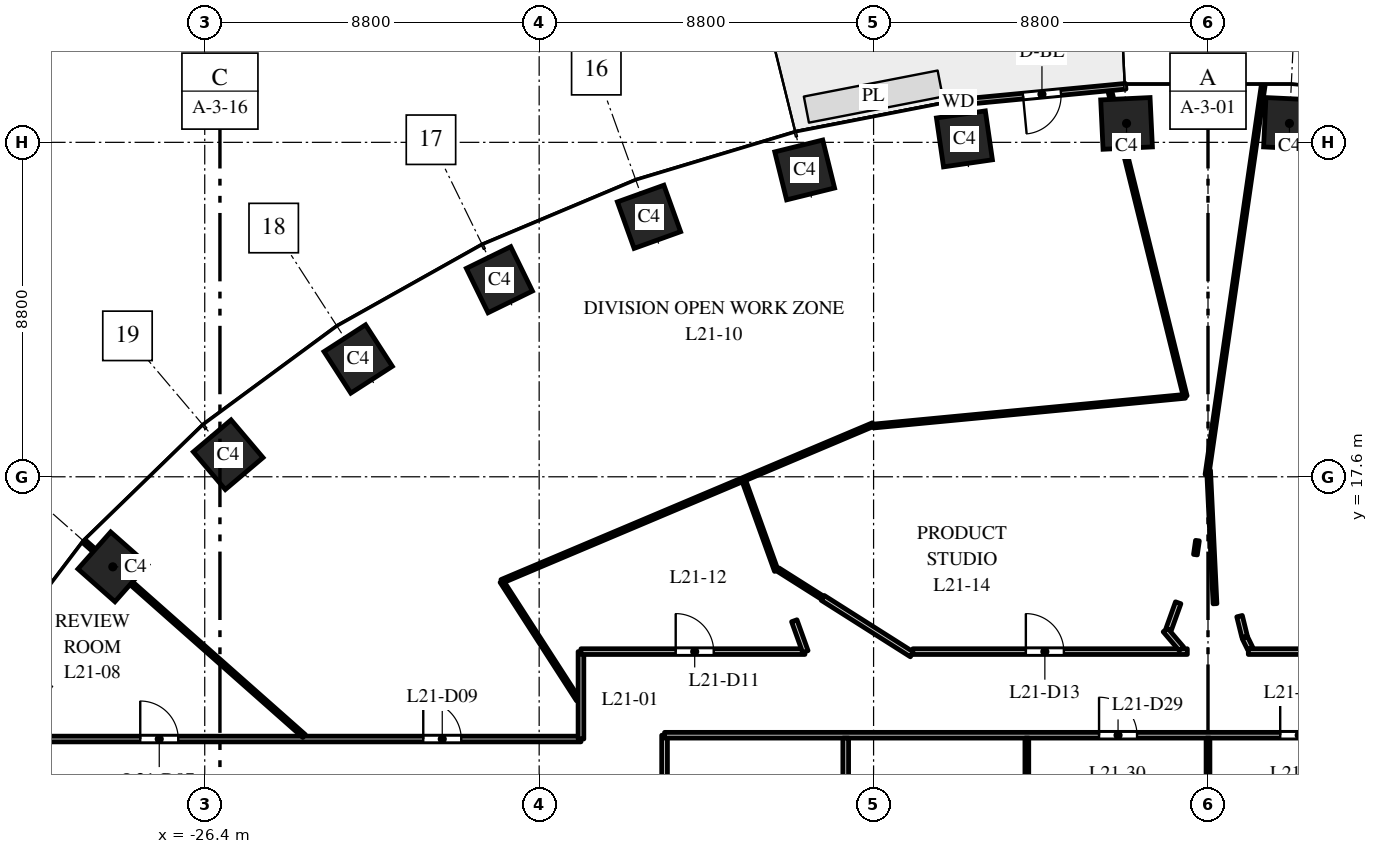
"""IFC4 building model, lengths in metres.
Left out: names, types, materials, properties, quantities, classifications, styles, units other than length and angle.
Written with IfcOpenShell. Run it as: python <this file> out.ifc"""

import sys

from ifc_helpers import new_model, si_unit, direction, frame, frame_2d, origin, origin_2d, place, context, subcontext, project, spatial, rectangle, extrude, element, fill, save


model = new_model("IFC4")
c1 = context("Model", 3, precision=1e-05, world=origin(), true_north=direction((0.0, 1.0)))
c2 = subcontext(c1, "Body", "Model", "MODEL_VIEW")
j1 = project(units=[si_unit("LENGTHUNIT", "METRE"), si_unit("PLANEANGLEUNIT", "RADIAN")], contexts=[c1])
p1 = place(None, origin())
s1 = spatial("IfcSite", under=j1, at=p1, CompositionType="ELEMENT")
p2 = place(p1, origin())
s2 = spatial("IfcBuilding", under=s1, at=p2, CompositionType="ELEMENT")
p3 = place(p2, frame((0.0, 0.0, 96.0)))
s3 = spatial("IfcBuildingStorey", under=s2, at=p3, CompositionType="ELEMENT", Elevation=96.0)
for number, where, z_axis, x_axis in (
    (1, (2.143, 26.898, 0.0), (0.0, 0.0, 1.0), (-0.999, 0.048, 0.0)),
    (2, (-2.143, 26.898, 0.0), (0.0, 0.0, 1.0), (-0.999, -0.048, 0.0)),
    (3, (-6.409, 26.491, 0.0), (0.0, 0.0, 1.0), (-0.99, -0.143, 0.0)),
    (4, (-10.613, 25.674, 0.0), (0.0, 0.0, 1.0), (-0.971, -0.24, 0.0)),
    (5, (-14.709, 24.441, 0.0), (0.0, 0.0, 1.0), (-0.941, -0.338, 0.0)),
    (6, (-18.646, 22.785, 0.0), (0.0, 0.0, 1.0), (-0.898, -0.439, 0.0)),
    (7, (-22.362, 20.7, 0.0), (0.0, 0.0, 1.0), (-0.84, -0.542, 0.0)),
    (8, (-25.783, 18.18, 0.0), (0.0, 0.0, 1.0), (-0.763, -0.646, 0.0)),
    (9, (-28.819, 15.23, 0.0), (0.0, 0.0, 1.0), (-0.663, -0.749, 0.0)),
):
    element("IfcColumn", number, at=place(p3, frame(where, z_axis=z_axis, x_axis=x_axis)), inside=s3, PredefinedType="COLUMN", context=c2, shape_type="SweptSolid", body=[
        extrude(rectangle(XDim=1.3, YDim=1.3, at=origin_2d()), origin(), (0.0, 0.0, 1.0), 4.0),
    ])
p4 = place(p3, frame((-2.166, 27.875, 0.0), z_axis=(0.0, 0.0, 1.0), x_axis=(-0.995473879823, -0.095035543824, 0.0)))
e10 = element("IfcWall", 10, at=p4, inside=s3, PredefinedType="STANDARD", context=c2, shape_type="SweptSolid", body=[
    extrude(rectangle(XDim=4.426, YDim=0.15, at=frame_2d((2.213, 0.0))), origin(), (0.0, 0.0, 1.0), 3.7),
])
p5 = place(p4, frame((1.713, 0.0, 0.0)))
e11 = element("IfcOpeningElement", 11, at=p5, cuts=e10, PredefinedType="OPENING", context=c2, shape_type="SweptSolid", body=[
    extrude(rectangle(XDim=1.0, YDim=2.4, at=frame_2d((0.5, 1.2))), frame((0.0, 0.085, 0.0), z_axis=(0.0, -1.0, 0.0), x_axis=(1.0, 0.0, 0.0)), (0.0, 0.0, 1.0), 0.17),
])
p6 = place(p3, frame((-31.5, 10.7, 0.0), z_axis=(0.0, 0.0, 1.0), x_axis=(1.0, 0.0, 0.0)))
e12 = element("IfcWall", 12, at=p6, inside=s3, PredefinedType="PARTITIONING", context=c2, shape_type="SweptSolid", body=[
    extrude(rectangle(XDim=15.0, YDim=0.15, at=frame_2d((7.5, 0.0))), origin(), (0.0, 0.0, 1.0), 3.1),
])
p7 = place(p6, frame((3.403, 0.0, 0.0)))
e13 = element("IfcOpeningElement", 13, at=p7, cuts=e12, PredefinedType="OPENING", context=c2, shape_type="SweptSolid", body=[
    extrude(rectangle(XDim=1.0, YDim=2.1, at=frame_2d((0.5, 1.05))), frame((0.0, 0.085, 0.0), z_axis=(0.0, -1.0, 0.0), x_axis=(1.0, 0.0, 0.0)), (0.0, 0.0, 1.0), 0.17),
])
p8 = place(p6, frame((10.85, 0.0, 0.0)))
e14 = element("IfcOpeningElement", 14, at=p8, cuts=e12, PredefinedType="OPENING", context=c2, shape_type="SweptSolid", body=[
    extrude(rectangle(XDim=1.0, YDim=2.1, at=frame_2d((0.5, 1.05))), frame((0.0, 0.085, 0.0), z_axis=(0.0, -1.0, 0.0), x_axis=(1.0, 0.0, 0.0)), (0.0, 0.0, 1.0), 0.17),
])
p9 = place(p3, frame((-29.569, 15.895, 0.0), z_axis=(0.0, 0.0, 1.0), x_axis=(0.748985701008, -0.662586160198, 0.0)))
e15 = element("IfcWall", 15, at=p9, inside=s3, PredefinedType="PARTITIONING", context=c2, shape_type="SweptSolid", body=[
    extrude(rectangle(XDim=7.723, YDim=0.1, at=frame_2d((3.861, 0.0))), origin(), (0.0, 0.0, 1.0), 2.9),
])
p10 = place(p3, frame((-18.586, 14.849, 0.0), z_axis=(0.0, 0.0, 1.0), x_axis=(0.542227325377, -0.840231829684, 0.0)))
e16 = element("IfcWall", 16, at=p10, inside=s3, PredefinedType="PARTITIONING", context=c2, shape_type="SweptSolid", body=[
    extrude(rectangle(XDim=3.709, YDim=0.1, at=frame_2d((1.854, 0.0))), origin(), (0.0, 0.0, 1.0), 2.75),
])
p11 = place(p3, frame((-18.586, 14.849, 0.0), z_axis=(0.0, 0.0, 1.0), x_axis=(0.921309292198, 0.388830539066, 0.0)))
e17 = element("IfcWall", 17, at=p11, inside=s3, PredefinedType="PARTITIONING", context=c2, shape_type="SweptSolid", body=[
    extrude(rectangle(XDim=10.609, YDim=0.1, at=frame_2d((5.304, 0.0))), origin(), (0.0, 0.0, 1.0), 2.85),
])
p12 = place(p3, frame((-16.5, 10.7, 0.0), z_axis=(0.0, 0.0, 1.0), x_axis=(0.0, 1.0, 0.0)))
e18 = element("IfcWall", 18, at=p12, inside=s3, PredefinedType="PARTITIONING", context=c2, shape_type="SweptSolid", body=[
    extrude(rectangle(XDim=2.3, YDim=0.15, at=frame_2d((1.15, 0.0))), origin(), (0.0, 0.0, 1.0), 2.75),
])
p13 = place(p3, frame((-16.5, 13.0, 0.0), z_axis=(0.0, 0.0, 1.0), x_axis=(1.0, 0.0, 0.0)))
e19 = element("IfcWall", 19, at=p13, inside=s3, PredefinedType="PARTITIONING", context=c2, shape_type="SweptSolid", body=[
    extrude(rectangle(XDim=5.893, YDim=0.15, at=frame_2d((2.947, 0.0))), origin(), (0.0, 0.0, 1.0), 2.85),
])
p14 = place(p13, frame((2.493, 0.0, 0.0)))
e20 = element("IfcOpeningElement", 20, at=p14, cuts=e19, PredefinedType="OPENING", context=c2, shape_type="SweptSolid", body=[
    extrude(rectangle(XDim=1.0, YDim=2.1, at=frame_2d((0.5, 1.05))), frame((0.0, 0.085, 0.0), z_axis=(0.0, -1.0, 0.0), x_axis=(1.0, 0.0, 0.0)), (0.0, 0.0, 1.0), 0.17),
])
p15 = place(p3, frame((-14.3, -10.8, 0.0), z_axis=(0.0, 0.0, 1.0), x_axis=(0.0, 1.0, 0.0)))
e21 = element("IfcWall", 21, at=p15, inside=s3, PredefinedType="PARTITIONING", context=c2, shape_type="SweptSolid", body=[
    extrude(rectangle(XDim=21.6, YDim=0.15, at=frame_2d((10.8, 0.0))), origin(), (0.0, 0.0, 1.0), 2.75),
])
p16 = place(p15, frame((10.4, 0.0, 0.0)))
e22 = element("IfcOpeningElement", 22, at=p16, cuts=e21, PredefinedType="OPENING", context=c2, shape_type="SweptSolid", body=[
    extrude(rectangle(XDim=1.0, YDim=2.1, at=frame_2d((0.5, 1.05))), frame((0.0, 0.085, 0.0), z_axis=(0.0, -1.0, 0.0), x_axis=(1.0, 0.0, 0.0)), (0.0, 0.0, 1.0), 0.17),
])
p17 = place(p3, frame((-14.3, 10.8, 0.0), z_axis=(0.0, 0.0, 1.0), x_axis=(1.0, 0.0, 0.0)))
e23 = element("IfcWall", 23, at=p17, inside=s3, PredefinedType="PARTITIONING", context=c2, shape_type="SweptSolid", body=[
    extrude(rectangle(XDim=28.6, YDim=0.15, at=frame_2d((14.3, 0.0))), origin(), (0.0, 0.0, 1.0), 2.85),
])
p18 = place(p17, frame((11.433, 0.0, 0.0)))
e24 = element("IfcOpeningElement", 24, at=p18, cuts=e23, PredefinedType="OPENING", context=c2, shape_type="SweptSolid", body=[
    extrude(rectangle(XDim=1.0, YDim=2.1, at=frame_2d((0.5, 1.05))), frame((0.0, 0.085, 0.0), z_axis=(0.0, -1.0, 0.0), x_axis=(1.0, 0.0, 0.0)), (0.0, 0.0, 1.0), 0.17),
])
p19 = place(p17, frame((16.2, 0.0, 0.0)))
e25 = element("IfcOpeningElement", 25, at=p19, cuts=e23, PredefinedType="OPENING", context=c2, shape_type="SweptSolid", body=[
    extrude(rectangle(XDim=1.0, YDim=2.1, at=frame_2d((0.5, 1.05))), frame((0.0, 0.085, 0.0), z_axis=(0.0, -1.0, 0.0), x_axis=(1.0, 0.0, 0.0)), (0.0, 0.0, 1.0), 0.17),
])
p20 = place(p17, frame((20.967, 0.0, 0.0)))
e26 = element("IfcOpeningElement", 26, at=p20, cuts=e23, PredefinedType="OPENING", context=c2, shape_type="SweptSolid", body=[
    extrude(rectangle(XDim=1.0, YDim=2.1, at=frame_2d((0.5, 1.05))), frame((0.0, 0.085, 0.0), z_axis=(0.0, -1.0, 0.0), x_axis=(1.0, 0.0, 0.0)), (0.0, 0.0, 1.0), 0.17),
])
p21 = place(p3, frame((-12.209, 17.486, 0.0), z_axis=(0.0, 0.0, 1.0), x_axis=(0.338698771758, -0.940894862357, 0.0)))
e27 = element("IfcWall", 27, at=p21, inside=s3, PredefinedType="PARTITIONING", context=c2, shape_type="SweptSolid", body=[
    extrude(rectangle(XDim=2.506, YDim=0.1, at=frame_2d((1.253, 0.0))), origin(), (0.0, 0.0, 1.0), 3.7),
])
p22 = place(p3, frame((-11.319, 15.161, 0.0), z_axis=(0.0, 0.0, 1.0), x_axis=(0.845102975348, -0.534603555037, 0.0)))
e28 = element("IfcWall", 28, at=p22, inside=s3, PredefinedType="PARTITIONING", context=c2, shape_type="SweptSolid", body=[
    extrude(rectangle(XDim=1.399, YDim=0.1, at=frame_2d((0.699, 0.0))), origin(), (0.0, 0.0, 1.0), 3.7),
])
p23 = place(p3, frame((-10.887, 13.812, 0.0), z_axis=(0.0, 0.0, 1.0), x_axis=(0.338378813476, -0.941009977944, 0.0)))
e29 = element("IfcWall", 29, at=p23, inside=s3, PredefinedType="PARTITIONING", context=c2, shape_type="SweptSolid", body=[
    extrude(rectangle(XDim=0.863, YDim=0.15, at=frame_2d((0.432, 0.0))), origin(), (0.0, 0.0, 1.0), 2.85),
])
p24 = place(p3, frame((-10.137, 14.413, 0.0), z_axis=(0.0, 0.0, 1.0), x_axis=(0.844666662568, -0.535292657475, 0.0)))
e30 = element("IfcWall", 30, at=p24, inside=s3, PredefinedType="PARTITIONING", context=c2, shape_type="SweptSolid", body=[
    extrude(rectangle(XDim=2.776, YDim=0.15, at=frame_2d((1.388, 0.0))), origin(), (0.0, 0.0, 1.0), 3.7),
])
p25 = place(p3, frame((-9.533, -10.725, 0.0), z_axis=(0.0, 0.0, 1.0), x_axis=(0.0, 1.0, 0.0)))
e31 = element("IfcWall", 31, at=p25, inside=s3, PredefinedType="PARTITIONING", context=c2, shape_type="SweptSolid", body=[
    extrude(rectangle(XDim=21.45, YDim=0.15, at=frame_2d((10.725, 0.0))), origin(), (0.0, 0.0, 1.0), 2.75),
])
p26 = place(p25, frame((15.575, 0.0, 0.0)))
e32 = element("IfcOpeningElement", 32, at=p26, cuts=e31, PredefinedType="OPENING", context=c2, shape_type="SweptSolid", body=[
    extrude(rectangle(XDim=1.0, YDim=2.1, at=frame_2d((0.5, 1.05))), frame((0.0, 0.085, 0.0), z_axis=(0.0, -1.0, 0.0), x_axis=(1.0, 0.0, 0.0)), (0.0, 0.0, 1.0), 0.17),
])
p27 = place(p3, frame((-8.802, 18.935, 0.0), z_axis=(0.0, 0.0, 1.0), x_axis=(0.995486812939, 0.094899975054, 0.0)))
e33 = element("IfcWall", 33, at=p27, inside=s3, PredefinedType="PARTITIONING", context=c2, shape_type="SweptSolid", body=[
    extrude(rectangle(XDim=8.24, YDim=0.1, at=frame_2d((4.12, 0.0))), origin(), (0.0, 0.0, 1.0), 2.85),
])
p28 = place(p3, frame((-7.767, 13.0, 0.0), z_axis=(0.0, 0.0, 1.0), x_axis=(1.0, 0.0, 0.0)))
e34 = element("IfcWall", 34, at=p28, inside=s3, PredefinedType="PARTITIONING", context=c2, shape_type="SweptSolid", body=[
    extrude(rectangle(XDim=7.223, YDim=0.15, at=frame_2d((3.612, 0.0))), origin(), (0.0, 0.0, 1.0), 2.85),
])
p29 = place(p28, frame((2.974, 0.0, 0.0)))
e35 = element("IfcOpeningElement", 35, at=p29, cuts=e34, PredefinedType="OPENING", context=c2, shape_type="SweptSolid", body=[
    extrude(rectangle(XDim=1.0, YDim=2.1, at=frame_2d((0.5, 1.05))), frame((0.0, 0.085, 0.0), z_axis=(0.0, -1.0, 0.0), x_axis=(1.0, 0.0, 0.0)), (0.0, 0.0, 1.0), 0.17),
])
p30 = place(p3, frame((-4.767, 6.363, 0.0), z_axis=(0.0, 0.0, 1.0), x_axis=(0.0, 1.0, 0.0)))
e36 = element("IfcWall", 36, at=p30, inside=s3, PredefinedType="PARTITIONING", context=c2, shape_type="SweptSolid", body=[
    extrude(rectangle(XDim=4.362, YDim=0.1, at=frame_2d((2.181, 0.0))), origin(), (0.0, 0.0, 1.0), 2.9),
])
p31 = place(p3, frame((-2.609, 27.858, 0.0), z_axis=(0.0, 0.0, 1.0), x_axis=(0.239677840558, -0.970852477334, 0.0)))
e37 = element("IfcWall", 37, at=p31, inside=s3, PredefinedType="PARTITIONING", context=c2, shape_type="SweptSolid", body=[
    extrude(rectangle(XDim=8.385, YDim=0.1, at=frame_2d((4.193, 0.0))), origin(), (0.0, 0.0, 1.0), 2.85),
])
p32 = place(p3, frame((-1.122, 13.57, 0.0), z_axis=(0.0, 0.0, 1.0), x_axis=(0.648780487805, -0.760975609756, 0.0)))
e38 = element("IfcWall", 38, at=p32, inside=s3, PredefinedType="PARTITIONING", context=c2, shape_type="SweptSolid", body=[
    extrude(rectangle(XDim=0.651, YDim=0.15, at=frame_2d((0.325, 0.0))), origin(), (0.0, 0.0, 1.0), 2.85),
])
p33 = place(p3, frame((-1.035, 13.586, 0.0), z_axis=(0.0, 0.0, 1.0), x_axis=(0.337939421495, 0.941167863561, 0.0)))
e39 = element("IfcWall", 39, at=p33, inside=s3, PredefinedType="PARTITIONING", context=c2, shape_type="SweptSolid", body=[
    extrude(rectangle(XDim=0.743, YDim=0.15, at=frame_2d((0.371, 0.0))), origin(), (0.0, 0.0, 1.0), 2.85),
])
p34 = place(p3, frame((-0.331, 15.551, 0.0), z_axis=(0.0, 0.0, 1.0), x_axis=(0.142155020728, 0.989844407006, 0.0)))
e40 = element("IfcWall", 40, at=p34, inside=s3, PredefinedType="PARTITIONING", context=c2, shape_type="SweptSolid", body=[
    extrude(rectangle(XDim=0.373, YDim=0.1, at=frame_2d((0.187, 0.0))), origin(), (0.0, 0.0, 1.0), 3.7),
])
p35 = place(p3, frame((-0.027, 17.654, 0.0), z_axis=(0.0, 0.0, 1.0), x_axis=(0.142950746257, 0.989729803605, 0.0)))
e41 = element("IfcWall", 41, at=p35, inside=s3, PredefinedType="PARTITIONING", context=c2, shape_type="SweptSolid", body=[
    extrude(rectangle(XDim=10.346, YDim=0.1, at=frame_2d((5.173, 0.0))), origin(), (0.0, 0.0, 1.0), 2.9),
])
p36 = place(p3, frame((0.0, 7.504, 0.0), z_axis=(0.0, 0.0, 1.0), x_axis=(0.0, 1.0, 0.0)))
e42 = element("IfcWall", 42, at=p36, inside=s3, PredefinedType="PARTITIONING", context=c2, shape_type="SweptSolid", body=[
    extrude(rectangle(XDim=3.221, YDim=0.1, at=frame_2d((1.611, 0.0))), origin(), (0.0, 0.0, 1.0), 3.7),
])
p37 = place(p3, frame((0.016, 17.767, 0.0), z_axis=(0.0, 0.0, 1.0), x_axis=(0.047839350467, -0.99885504281, 0.0)))
e43 = element("IfcWall", 43, at=p37, inside=s3, PredefinedType="PARTITIONING", context=c2, shape_type="SweptSolid", body=[
    extrude(rectangle(XDim=3.511, YDim=0.1, at=frame_2d((1.755, 0.0))), origin(), (0.0, 0.0, 1.0), 3.7),
])
p38 = place(p3, frame((0.83, 13.933, 0.0), z_axis=(0.0, 0.0, 1.0), x_axis=(0.239578315167, -0.970877042113, 0.0)))
e44 = element("IfcWall", 44, at=p38, inside=s3, PredefinedType="PARTITIONING", context=c2, shape_type="SweptSolid", body=[
    extrude(rectangle(XDim=0.563, YDim=0.15, at=frame_2d((0.282, 0.0))), origin(), (0.0, 0.0, 1.0), 3.7),
])
p39 = place(p3, frame((0.969, 13.369, 0.0), z_axis=(0.0, 0.0, 1.0), x_axis=(0.440240923942, -0.897879685084, 0.0)))
e45 = element("IfcWall", 45, at=p39, inside=s3, PredefinedType="PARTITIONING", context=c2, shape_type="SweptSolid", body=[
    extrude(rectangle(XDim=0.323, YDim=0.15, at=frame_2d((0.161, 0.0))), origin(), (0.0, 0.0, 1.0), 3.7),
])
p40 = place(p3, frame((1.061, 13.0, 0.0), z_axis=(0.0, 0.0, 1.0), x_axis=(1.0, 0.0, 0.0)))
e46 = element("IfcWall", 46, at=p40, inside=s3, PredefinedType="PARTITIONING", context=c2, shape_type="SweptSolid", body=[
    extrude(rectangle(XDim=6.422, YDim=0.15, at=frame_2d((3.211, 0.0))), origin(), (0.0, 0.0, 1.0), 2.85),
])
p41 = place(p40, frame((2.788, 0.0, 0.0)))
e47 = element("IfcOpeningElement", 47, at=p41, cuts=e46, PredefinedType="OPENING", context=c2, shape_type="SweptSolid", body=[
    extrude(rectangle(XDim=1.0, YDim=2.1, at=frame_2d((0.5, 1.05))), frame((0.0, 0.085, 0.0), z_axis=(0.0, -1.0, 0.0), x_axis=(1.0, 0.0, 0.0)), (0.0, 0.0, 1.0), 0.17),
])
p42 = place(p5, origin())
e48 = element("IfcDoor", 48, at=p42, inside=s3, OperationType="SINGLE_SWING_RIGHT", PredefinedType="DOOR", context=c2, shape_type="SweptSolid", body=[
    extrude(rectangle(XDim=1.0, YDim=2.4, at=frame_2d((0.5, 1.2))), frame((0.0, 0.025, 0.0), z_axis=(0.0, -1.0, 0.0), x_axis=(1.0, 0.0, 0.0)), (0.0, 0.0, 1.0), 0.05),
])
fill(e11, e48)
p43 = place(p7, origin())
e49 = element("IfcDoor", 49, at=p43, inside=s3, OperationType="SINGLE_SWING_LEFT", PredefinedType="DOOR", context=c2, shape_type="SweptSolid", body=[
    extrude(rectangle(XDim=1.0, YDim=2.1, at=frame_2d((0.5, 1.05))), frame((0.0, 0.025, 0.0), z_axis=(0.0, -1.0, 0.0), x_axis=(1.0, 0.0, 0.0)), (0.0, 0.0, 1.0), 0.05),
])
fill(e13, e49)
p44 = place(p8, origin())
e50 = element("IfcDoor", 50, at=p44, inside=s3, OperationType="SINGLE_SWING_LEFT", PredefinedType="DOOR", context=c2, shape_type="SweptSolid", body=[
    extrude(rectangle(XDim=1.0, YDim=2.1, at=frame_2d((0.5, 1.05))), frame((0.0, 0.025, 0.0), z_axis=(0.0, -1.0, 0.0), x_axis=(1.0, 0.0, 0.0)), (0.0, 0.0, 1.0), 0.05),
])
fill(e14, e50)
p45 = place(p14, origin())
e51 = element("IfcDoor", 51, at=p45, inside=s3, OperationType="SINGLE_SWING_LEFT", PredefinedType="DOOR", context=c2, shape_type="SweptSolid", body=[
    extrude(rectangle(XDim=1.0, YDim=2.1, at=frame_2d((0.5, 1.05))), frame((0.0, 0.025, 0.0), z_axis=(0.0, -1.0, 0.0), x_axis=(1.0, 0.0, 0.0)), (0.0, 0.0, 1.0), 0.05),
])
fill(e20, e51)
p46 = place(p29, origin())
e52 = element("IfcDoor", 52, at=p46, inside=s3, OperationType="SINGLE_SWING_LEFT", PredefinedType="DOOR", context=c2, shape_type="SweptSolid", body=[
    extrude(rectangle(XDim=1.0, YDim=2.1, at=frame_2d((0.5, 1.05))), frame((0.0, 0.025, 0.0), z_axis=(0.0, -1.0, 0.0), x_axis=(1.0, 0.0, 0.0)), (0.0, 0.0, 1.0), 0.05),
])
fill(e35, e52)
p47 = place(p18, origin())
e53 = element("IfcDoor", 53, at=p47, inside=s3, OperationType="SINGLE_SWING_LEFT", PredefinedType="DOOR", context=c2, shape_type="SweptSolid", body=[
    extrude(rectangle(XDim=1.0, YDim=2.1, at=frame_2d((0.5, 1.05))), frame((0.0, 0.025, 0.0), z_axis=(0.0, -1.0, 0.0), x_axis=(1.0, 0.0, 0.0)), (0.0, 0.0, 1.0), 0.05),
])
fill(e24, e53)
p48 = place(p19, origin())
e54 = element("IfcDoor", 54, at=p48, inside=s3, OperationType="SINGLE_SWING_LEFT", PredefinedType="DOOR", context=c2, shape_type="SweptSolid", body=[
    extrude(rectangle(XDim=1.0, YDim=2.1, at=frame_2d((0.5, 1.05))), frame((0.0, 0.025, 0.0), z_axis=(0.0, -1.0, 0.0), x_axis=(1.0, 0.0, 0.0)), (0.0, 0.0, 1.0), 0.05),
])
fill(e25, e54)
save(model, sys.argv[1])
